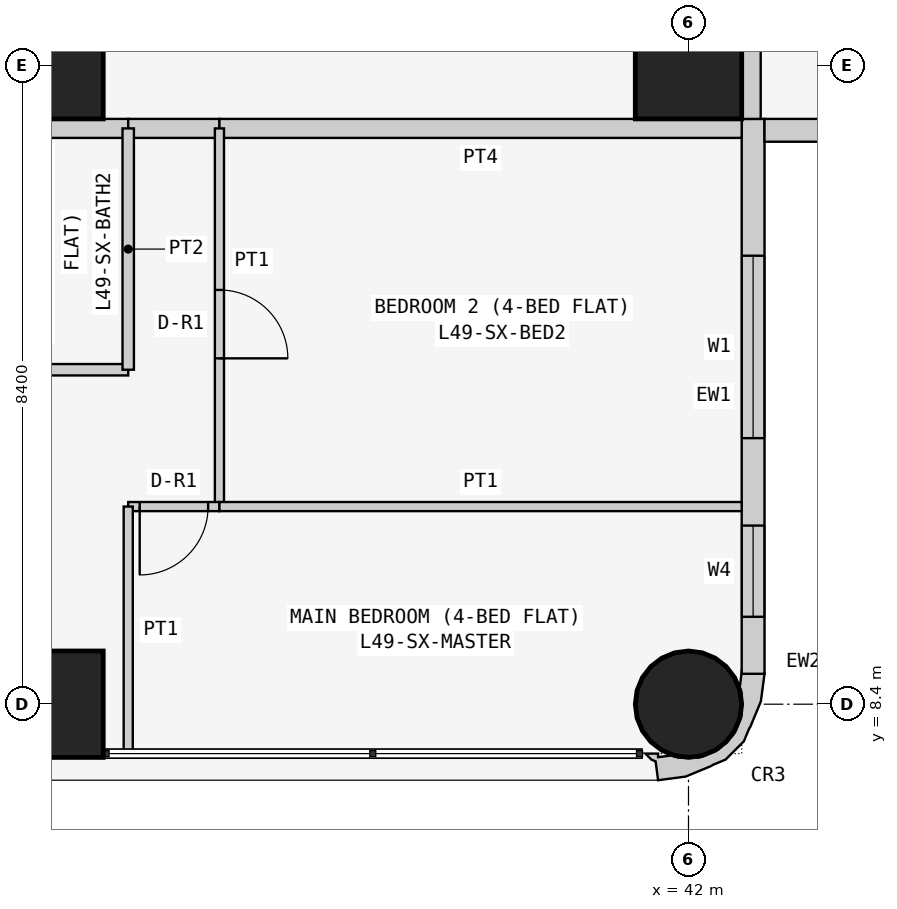
"""IFC4 building model, lengths in metres.
Left out: names, types, materials, properties, quantities, classifications, styles, units other than length and angle.
Written with IfcOpenShell. Run it as: python <this file> out.ifc"""

import sys

from ifc_helpers import new_model, si_unit, direction, frame, frame_2d, origin, origin_2d, place, context, subcontext, project, spatial, polyline, rectangle, circle, outline, extrude, element, fill, save


model = new_model("IFC4")
c1 = context("Model", 3, precision=1e-05, world=origin(), true_north=direction((0.0, 1.0)))
c2 = subcontext(c1, "Body", "Model", "MODEL_VIEW")
j1 = project(units=[si_unit("LENGTHUNIT", "METRE"), si_unit("PLANEANGLEUNIT", "RADIAN")], contexts=[c1])
p1 = place(None, origin())
s1 = spatial("IfcSite", under=j1, at=p1, CompositionType="ELEMENT")
p2 = place(p1, origin())
s2 = spatial("IfcBuilding", under=s1, at=p2, CompositionType="ELEMENT")
p3 = place(p2, frame((0.0, 0.0, 190.5)))
s3 = spatial("IfcBuildingStorey", under=s2, at=p3, CompositionType="ELEMENT", Elevation=190.5)
for number, where, z_axis, x_axis in (
    (1, (33.6, 8.4, 0.0), (0.0, 0.0, 1.0), (1.0, 0.0, 0.0)),
    (2, (33.6, 16.8, 0.0), (0.0, 0.0, 1.0), (1.0, 0.0, 0.0)),
):
    element("IfcColumn", number, at=place(p3, frame(where, z_axis=z_axis, x_axis=x_axis)), inside=s3, PredefinedType="COLUMN", context=c2, shape_type="SweptSolid", body=[
        extrude(rectangle(XDim=1.4, YDim=1.4, at=origin_2d()), origin(), (0.0, 0.0, 1.0), 3.6),
    ])
p4 = place(p3, frame((42.0, 8.4, 0.0), z_axis=(0.0, 0.0, 1.0), x_axis=(1.0, 0.0, 0.0)))
e3 = element("IfcColumn", 3, at=p4, inside=s3, PredefinedType="COLUMN", context=c2, shape_type="SweptSolid", body=[
    extrude(circle(Radius=0.7, at=origin_2d()), origin(), (0.0, 0.0, 1.0), 3.6),
])
p5 = place(p3, frame((42.0, 16.8, 0.0), z_axis=(0.0, 0.0, 1.0), x_axis=(1.0, 0.0, 0.0)))
e4 = element("IfcColumn", 4, at=p5, inside=s3, PredefinedType="COLUMN", context=c2, shape_type="SweptSolid", body=[
    extrude(rectangle(XDim=1.4, YDim=1.4, at=origin_2d()), origin(), (0.0, 0.0, 1.0), 3.6),
])
p6 = place(p3, frame((42.85, 8.8, 0.0), z_axis=(0.0, 0.0, 1.0), x_axis=(0.0, 1.0, 0.0)))
e5 = element("IfcWall", 5, at=p6, inside=s3, PredefinedType="SOLIDWALL", context=c2, shape_type="SweptSolid", body=[
    extrude(rectangle(XDim=7.3, YDim=0.3, at=frame_2d((3.65, 0.0))), origin(), (0.0, 0.0, 1.0), 3.45),
])
p7 = place(p6, frame((3.1, 0.0, 0.9)))
e6 = element("IfcOpeningElement", 6, at=p7, cuts=e5, PredefinedType="OPENING", context=c2, shape_type="SweptSolid", body=[
    extrude(rectangle(XDim=2.4, YDim=1.5, at=frame_2d((1.2, 0.75))), frame((0.0, 0.16, 0.0), z_axis=(0.0, -1.0, 0.0), x_axis=(1.0, 0.0, 0.0)), (0.0, 0.0, 1.0), 0.32),
])
p8 = place(p6, frame((0.75, 0.0, 0.9)))
e7 = element("IfcOpeningElement", 7, at=p8, cuts=e5, PredefinedType="OPENING", context=c2, shape_type="SweptSolid", body=[
    extrude(rectangle(XDim=1.2, YDim=1.5, at=frame_2d((0.6, 0.75))), frame((0.0, 0.16, 0.0), z_axis=(0.0, -1.0, 0.0), x_axis=(1.0, 0.0, 0.0)), (0.0, 0.0, 1.0), 0.32),
])
p9 = place(p3, frame((43.0, 15.95, 0.0), z_axis=(0.0, 0.0, 1.0), x_axis=(1.0, 0.0, 0.0)))
e8 = element("IfcWall", 8, at=p9, inside=s3, PredefinedType="SOLIDWALL", context=c2, shape_type="SweptSolid", body=[
    extrude(rectangle(XDim=7.0, YDim=0.3, at=frame_2d((3.5, 0.0))), origin(), (0.0, 0.0, 1.0), 3.45),
])
p10 = place(p9, frame((1.5, 0.0, 0.9)))
e9 = element("IfcOpeningElement", 9, at=p10, cuts=e8, PredefinedType="OPENING", context=c2, shape_type="SweptSolid", body=[
    extrude(rectangle(XDim=2.4, YDim=1.5, at=frame_2d((1.2, 0.75))), frame((0.0, 0.16, 0.0), z_axis=(0.0, -1.0, 0.0), x_axis=(1.0, 0.0, 0.0)), (0.0, 0.0, 1.0), 0.32),
])
p11 = place(p9, frame((5.05, 0.0, 0.9)))
e10 = element("IfcOpeningElement", 10, at=p11, cuts=e8, PredefinedType="OPENING", context=c2, shape_type="SweptSolid", body=[
    extrude(rectangle(XDim=1.2, YDim=1.5, at=frame_2d((0.6, 0.75))), frame((0.0, 0.16, 0.0), z_axis=(0.0, -1.0, 0.0), x_axis=(1.0, 0.0, 0.0)), (0.0, 0.0, 1.0), 0.32),
])
p12 = place(p3, frame((41.488, 7.812, 0.0), z_axis=(0.0, 0.0, 1.0), x_axis=(0.439933741929, -0.898030234854, 0.0)))
e11 = element("IfcWall", 11, at=p12, inside=s3, PredefinedType="SOLIDWALL", context=c2, shape_type="SweptSolid", body=[
    extrude(outline(polyline([(-0.222, 1.793), (-0.39, 1.541), (-0.372, 1.532), (-0.195, 1.414), (-0.12, 1.41), (0.131, 1.287), (0.315, 1.078), (0.406, 0.814), (0.388, 0.536), (0.265, 0.285), (0.209, 0.235), (0.148, 0.053), (0.105, 0.074), (0.032, -0.076), (0.138, -0.04), (0.182, -0.0), (0.419, -0.08), (0.536, 0.266), (0.559, 0.631), (0.555, 0.651), (0.566, 0.836), (0.455, 1.159), (0.333, 1.298), (0.324, 1.317), (0.082, 1.591), (-0.222, 1.793)])), origin(), (0.0, 0.0, 1.0), 3.45),
])
p13 = place(p3, frame((42.825, 22.971, 0.0), z_axis=(0.0, 0.0, 1.0), x_axis=(0.0, -1.0, 0.0)))
e12 = element("IfcWall", 12, at=p13, inside=s3, PredefinedType="PARTITIONING", context=c2, shape_type="SweptSolid", body=[
    extrude(rectangle(XDim=6.871, YDim=0.25, at=frame_2d((3.436, 0.0))), origin(), (0.0, 0.0, 1.0), 3.45),
])
p14 = place(p3, frame((34.629, 15.975, 0.0), z_axis=(0.0, 0.0, 1.0), x_axis=(-1.0, 0.0, 0.0)))
e13 = element("IfcWall", 13, at=p14, inside=s3, PredefinedType="PARTITIONING", context=c2, shape_type="SweptSolid", body=[
    extrude(rectangle(XDim=2.629, YDim=0.25, at=frame_2d((1.314, 0.0))), origin(), (0.0, 0.0, 1.0), 3.45),
])
p15 = place(p3, frame((35.829, 15.975, 0.0), z_axis=(0.0, 0.0, 1.0), x_axis=(-1.0, 0.0, 0.0)))
e14 = element("IfcWall", 14, at=p15, inside=s3, PredefinedType="PARTITIONING", context=c2, shape_type="SweptSolid", body=[
    extrude(rectangle(XDim=1.2, YDim=0.25, at=frame_2d((0.6, 0.0))), origin(), (0.0, 0.0, 1.0), 3.45),
])
p16 = place(p3, frame((42.7, 15.975, 0.0), z_axis=(0.0, 0.0, 1.0), x_axis=(-1.0, 0.0, 0.0)))
e15 = element("IfcWall", 15, at=p16, inside=s3, PredefinedType="PARTITIONING", context=c2, shape_type="SweptSolid", body=[
    extrude(rectangle(XDim=6.871, YDim=0.25, at=frame_2d((3.436, 0.0))), origin(), (0.0, 0.0, 1.0), 3.45),
])
p17 = place(p3, frame((32.0, 12.8, 0.0), z_axis=(0.0, 0.0, 1.0), x_axis=(1.0, 0.0, 0.0)))
e16 = element("IfcWall", 16, at=p17, inside=s3, PredefinedType="PARTITIONING", context=c2, shape_type="SweptSolid", body=[
    extrude(rectangle(XDim=2.629, YDim=0.15, at=frame_2d((1.314, 0.0))), origin(), (0.0, 0.0, 1.0), 3.45),
])
p18 = place(p3, frame((34.629, 12.8, 0.0), z_axis=(0.0, 0.0, 1.0), x_axis=(0.0, 1.0, 0.0)))
e17 = element("IfcWall", 17, at=p18, inside=s3, PredefinedType="PARTITIONING", context=c2, shape_type="SweptSolid", body=[
    extrude(rectangle(XDim=3.175, YDim=0.15, at=frame_2d((1.587, 0.0))), origin(), (0.0, 0.0, 1.0), 3.45),
])
p19 = place(p3, frame((35.829, 15.975, 0.0), z_axis=(0.0, 0.0, 1.0), x_axis=(0.0, -1.0, 0.0)))
e18 = element("IfcWall", 18, at=p19, inside=s3, PredefinedType="PARTITIONING", context=c2, shape_type="SweptSolid", body=[
    extrude(rectangle(XDim=4.975, YDim=0.12, at=frame_2d((2.488, 0.0))), origin(), (0.0, 0.0, 1.0), 3.45),
])
p20 = place(p19, frame((2.125, 0.0, 0.0)))
e19 = element("IfcOpeningElement", 19, at=p20, cuts=e18, PredefinedType="OPENING", context=c2, shape_type="SweptSolid", body=[
    extrude(rectangle(XDim=0.9, YDim=2.1, at=frame_2d((0.45, 1.05))), frame((0.0, 0.07, 0.0), z_axis=(0.0, -1.0, 0.0), x_axis=(1.0, 0.0, 0.0)), (0.0, 0.0, 1.0), 0.14),
])
p21 = place(p3, frame((35.829, 11.0, 0.0), z_axis=(0.0, 0.0, 1.0), x_axis=(-1.0, 0.0, 0.0)))
e20 = element("IfcWall", 20, at=p21, inside=s3, PredefinedType="PARTITIONING", context=c2, shape_type="SweptSolid", body=[
    extrude(rectangle(XDim=1.2, YDim=0.12, at=frame_2d((0.6, 0.0))), origin(), (0.0, 0.0, 1.0), 3.45),
])
p22 = place(p21, frame((0.149, 0.0, 0.0)))
e21 = element("IfcOpeningElement", 21, at=p22, cuts=e20, PredefinedType="OPENING", context=c2, shape_type="SweptSolid", body=[
    extrude(rectangle(XDim=0.9, YDim=2.1, at=frame_2d((0.45, 1.05))), frame((0.0, 0.07, 0.0), z_axis=(0.0, -1.0, 0.0), x_axis=(1.0, 0.0, 0.0)), (0.0, 0.0, 1.0), 0.14),
])
p23 = place(p3, frame((34.629, 11.0, 0.0), z_axis=(0.0, 0.0, 1.0), x_axis=(0.0, -1.0, 0.0)))
e22 = element("IfcWall", 22, at=p23, inside=s3, PredefinedType="PARTITIONING", context=c2, shape_type="SweptSolid", body=[
    extrude(rectangle(XDim=3.25, YDim=0.12, at=frame_2d((1.625, 0.0))), origin(), (0.0, 0.0, 1.0), 3.45),
])
p24 = place(p3, frame((35.829, 11.0, 0.0), z_axis=(0.0, 0.0, 1.0), x_axis=(1.0, 0.0, 0.0)))
e23 = element("IfcWall", 23, at=p24, inside=s3, PredefinedType="PARTITIONING", context=c2, shape_type="SweptSolid", body=[
    extrude(rectangle(XDim=6.871, YDim=0.12, at=frame_2d((3.436, 0.0))), origin(), (0.0, 0.0, 1.0), 3.45),
])
p25 = place(p7, origin())
e24 = element("IfcWindow", 24, at=p25, inside=s3, PartitioningType="SINGLE_PANEL", PredefinedType="WINDOW", context=c2, shape_type="SweptSolid", body=[
    extrude(rectangle(XDim=2.4, YDim=1.5, at=frame_2d((1.2, 0.75))), frame((0.0, 0.03, 0.0), z_axis=(0.0, -1.0, 0.0), x_axis=(1.0, 0.0, 0.0)), (0.0, 0.0, 1.0), 0.06),
])
fill(e6, e24)
p26 = place(p8, origin())
e25 = element("IfcWindow", 25, at=p26, inside=s3, PartitioningType="SINGLE_PANEL", PredefinedType="WINDOW", context=c2, shape_type="SweptSolid", body=[
    extrude(rectangle(XDim=1.2, YDim=1.5, at=frame_2d((0.6, 0.75))), frame((0.0, 0.03, 0.0), z_axis=(0.0, -1.0, 0.0), x_axis=(1.0, 0.0, 0.0)), (0.0, 0.0, 1.0), 0.06),
])
fill(e7, e25)
p27 = place(p20, origin())
e26 = element("IfcDoor", 26, at=p27, inside=s3, OperationType="SINGLE_SWING_RIGHT", PredefinedType="DOOR", context=c2, shape_type="SweptSolid", body=[
    extrude(rectangle(XDim=0.9, YDim=2.1, at=frame_2d((0.45, 1.05))), frame((0.0, 0.025, 0.0), z_axis=(0.0, -1.0, 0.0), x_axis=(1.0, 0.0, 0.0)), (0.0, 0.0, 1.0), 0.05),
])
fill(e19, e26)
p28 = place(p22, origin())
e27 = element("IfcDoor", 27, at=p28, inside=s3, OperationType="SINGLE_SWING_RIGHT", PredefinedType="DOOR", context=c2, shape_type="SweptSolid", body=[
    extrude(rectangle(XDim=0.9, YDim=2.1, at=frame_2d((0.45, 1.05))), frame((0.0, 0.025, 0.0), z_axis=(0.0, -1.0, 0.0), x_axis=(1.0, 0.0, 0.0)), (0.0, 0.0, 1.0), 0.05),
])
fill(e21, e27)
save(model, sys.argv[1])
